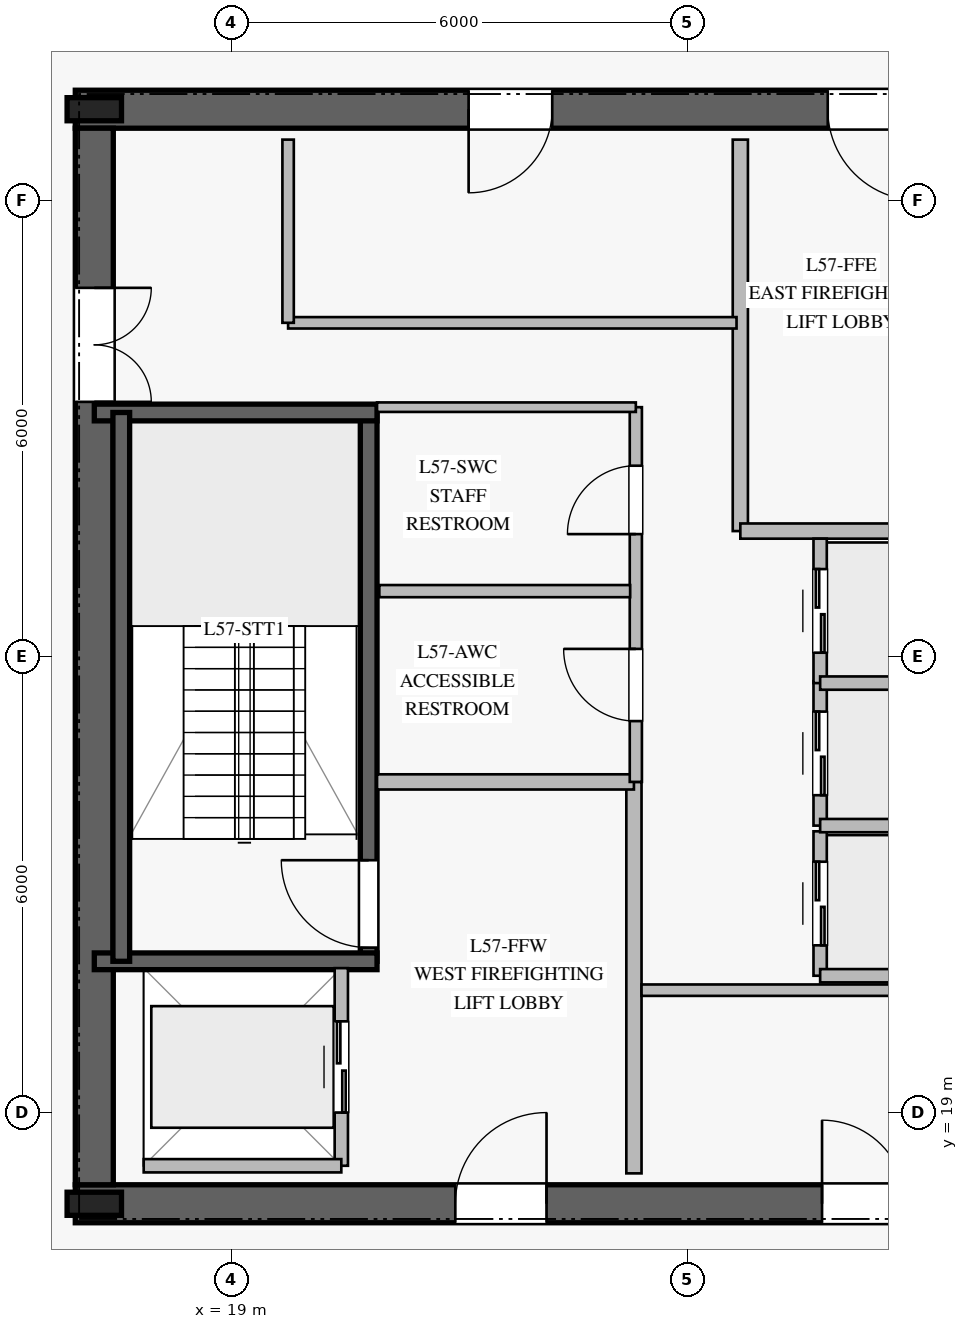
"""IFC4 building model, lengths in metres.
Left out: names, types, materials, properties, quantities, classifications, styles, units other than length and angle.
Written with IfcOpenShell. Run it as: python <this file> out.ifc"""

import sys

from ifc_helpers import new_model, si_unit, direction, frame, frame_2d, origin, origin_2d, place, context, subcontext, project, spatial, rectangle, i_section, extrude, element, fill, save


model = new_model("IFC4")
c1 = context("Model", 3, precision=1e-05, world=origin(), true_north=direction((0.0, 1.0)))
c2 = subcontext(c1, "Body", "Model", "MODEL_VIEW")
j1 = project(units=[si_unit("LENGTHUNIT", "METRE"), si_unit("PLANEANGLEUNIT", "RADIAN")], contexts=[c1])
p1 = place(None, origin())
s1 = spatial("IfcSite", under=j1, at=p1, CompositionType="ELEMENT")
p2 = place(p1, origin())
s2 = spatial("IfcBuilding", under=s1, at=p2, CompositionType="ELEMENT")
p3 = place(p2, frame((0.0, 0.0, 236.8)))
s3 = spatial("IfcBuildingStorey", under=s2, at=p3, CompositionType="ELEMENT", Elevation=236.8)
p4 = place(p3, frame((16.95, 17.8, 0.0), z_axis=(0.0, 0.0, 1.0), x_axis=(1.0, 0.0, 0.0)))
e1 = element("IfcWall", 1, at=p4, inside=s3, PredefinedType="SHEAR", context=c2, shape_type="SweptSolid", body=[
    extrude(rectangle(XDim=16.1, YDim=0.5, at=frame_2d((8.05, 0.0))), origin(), (0.0, 0.0, 1.0), 3.78),
])
p5 = place(p4, frame((5.0, 0.0, 0.0)))
e2 = element("IfcOpeningElement", 2, at=p5, cuts=e1, PredefinedType="OPENING", context=c2, shape_type="SweptSolid", body=[
    extrude(rectangle(XDim=1.2, YDim=2.25, at=frame_2d((0.6, 1.125))), frame((0.0, 0.26, 0.0), z_axis=(0.0, -1.0, 0.0), x_axis=(1.0, 0.0, 0.0)), (0.0, 0.0, 1.0), 0.52),
])
p6 = place(p4, frame((13.95, 0.0, 0.0)))
e3 = element("IfcOpeningElement", 3, at=p6, cuts=e1, PredefinedType="OPENING", context=c2, shape_type="SweptSolid", body=[
    extrude(rectangle(XDim=0.9, YDim=2.1, at=frame_2d((0.45, 1.05))), frame((0.0, 0.26, 0.0), z_axis=(0.0, -1.0, 0.0), x_axis=(1.0, 0.0, 0.0)), (0.0, 0.0, 1.0), 0.52),
])
p7 = place(p4, frame((9.825, 0.0, 0.0)))
e4 = element("IfcOpeningElement", 4, at=p7, cuts=e1, PredefinedType="OPENING", context=c2, shape_type="SweptSolid", body=[
    extrude(rectangle(XDim=1.1, YDim=2.2, at=frame_2d((0.55, 1.1))), frame((0.0, 0.26, 0.0), z_axis=(0.0, -1.0, 0.0), x_axis=(1.0, 0.0, 0.0)), (0.0, 0.0, 1.0), 0.52),
])
p8 = place(p3, frame((33.05, 32.2, 0.0), z_axis=(0.0, 0.0, 1.0), x_axis=(-1.0, 0.0, 0.0)))
e5 = element("IfcWall", 5, at=p8, inside=s3, PredefinedType="SHEAR", context=c2, shape_type="SweptSolid", body=[
    extrude(rectangle(XDim=16.1, YDim=0.5, at=frame_2d((8.05, 0.0))), origin(), (0.0, 0.0, 1.0), 3.78),
])
p9 = place(p8, frame((5.0, 0.0, 0.0)))
e6 = element("IfcOpeningElement", 6, at=p9, cuts=e5, PredefinedType="OPENING", context=c2, shape_type="SweptSolid", body=[
    extrude(rectangle(XDim=1.2, YDim=2.25, at=frame_2d((0.6, 1.125))), frame((0.0, 0.26, 0.0), z_axis=(0.0, -1.0, 0.0), x_axis=(1.0, 0.0, 0.0)), (0.0, 0.0, 1.0), 0.52),
])
p10 = place(p8, frame((9.825, 0.0, 0.0)))
e7 = element("IfcOpeningElement", 7, at=p10, cuts=e5, PredefinedType="OPENING", context=c2, shape_type="SweptSolid", body=[
    extrude(rectangle(XDim=1.1, YDim=2.2, at=frame_2d((0.55, 1.1))), frame((0.0, 0.26, 0.0), z_axis=(0.0, -1.0, 0.0), x_axis=(1.0, 0.0, 0.0)), (0.0, 0.0, 1.0), 0.52),
])
p11 = place(p3, frame((17.2, 31.95, 0.0), z_axis=(0.0, 0.0, 1.0), x_axis=(0.0, -1.0, 0.0)))
e8 = element("IfcWall", 8, at=p11, inside=s3, PredefinedType="SHEAR", context=c2, shape_type="SweptSolid", body=[
    extrude(rectangle(XDim=13.9, YDim=0.5, at=frame_2d((6.95, 0.0))), origin(), (0.0, 0.0, 1.0), 3.78),
])
p12 = place(p11, frame((2.1, 0.0, 0.0)))
e9 = element("IfcOpeningElement", 9, at=p12, cuts=e8, PredefinedType="OPENING", context=c2, shape_type="SweptSolid", body=[
    extrude(rectangle(XDim=1.5, YDim=2.2, at=frame_2d((0.75, 1.1))), frame((0.0, 0.26, 0.0), z_axis=(0.0, -1.0, 0.0), x_axis=(1.0, 0.0, 0.0)), (0.0, 0.0, 1.0), 0.52),
])
for number, where, z_axis, x_axis in (
    (10, (17.2, 17.8, 0.0), (0.0, 0.0, 1.0), (1.0, 0.0, 0.0)),
    (11, (17.2, 32.2, 0.0), (0.0, 0.0, 1.0), (1.0, 0.0, 0.0)),
):
    element("IfcColumn", number, at=place(p3, frame(where, z_axis=z_axis, x_axis=x_axis)), inside=s3, PredefinedType="COLUMN", context=c2, shape_type="SweptSolid", body=[
        extrude(i_section(OverallWidth=0.304, OverallDepth=0.716, WebThickness=0.021, FlangeThickness=0.04, at=origin_2d()), origin(), (0.0, 0.0, 1.0), 4.0),
    ])
p13 = place(p3, frame((20.81, 20.99, 0.0), z_axis=(0.0, 0.0, 1.0), x_axis=(0.0, 1.0, 0.0)))
e12 = element("IfcWall", 12, at=p13, inside=s3, PredefinedType="SOLIDWALL", context=c2, shape_type="SweptSolid", body=[
    extrude(rectangle(XDim=7.22, YDim=0.22, at=frame_2d((3.61, 0.0))), origin(), (0.0, 0.0, 1.0), 3.78),
])
p14 = place(p13, frame((0.18, 0.0, 0.0)))
e13 = element("IfcOpeningElement", 13, at=p14, cuts=e12, PredefinedType="OPENING", context=c2, shape_type="SweptSolid", body=[
    extrude(rectangle(XDim=1.15, YDim=2.2, at=frame_2d((0.575, 1.1))), frame((0.0, 0.12, 0.0), z_axis=(0.0, -1.0, 0.0), x_axis=(1.0, 0.0, 0.0)), (0.0, 0.0, 1.0), 0.24),
])
for number, where, z_axis, x_axis in (
    (14, (17.2, 20.99, 0.0), (0.0, 0.0, 1.0), (1.0, 0.0, 0.0)),
    (15, (17.2, 28.21, 0.0), (0.0, 0.0, 1.0), (1.0, 0.0, 0.0)),
):
    element("IfcWall", number, at=place(p3, frame(where, z_axis=z_axis, x_axis=x_axis)), inside=s3, PredefinedType="SOLIDWALL", context=c2, shape_type="SweptSolid", body=[
        extrude(rectangle(XDim=3.72, YDim=0.22, at=frame_2d((1.86, 0.0))), origin(), (0.0, 0.0, 1.0), 3.78),
    ])
p15 = place(p3, frame((17.555, 28.21, 0.0), z_axis=(0.0, 0.0, 1.0), x_axis=(0.0, -1.0, 0.0)))
e16 = element("IfcWall", 16, at=p15, inside=s3, PredefinedType="SOLIDWALL", context=c2, shape_type="SweptSolid", body=[
    extrude(rectangle(XDim=7.22, YDim=0.22, at=frame_2d((3.61, 0.0))), origin(), (0.0, 0.0, 1.0), 3.78),
])
p16 = place(p3, frame((24.3, 18.2, 0.0), z_axis=(0.0, 0.0, 1.0), x_axis=(0.0, 1.0, 0.0)))
e17 = element("IfcWall", 17, at=p16, inside=s3, PredefinedType="PARTITIONING", context=c2, shape_type="SweptSolid", body=[
    extrude(rectangle(XDim=5.15, YDim=0.2, at=frame_2d((2.575, 0.0))), origin(), (0.0, 0.0, 1.0), 3.78),
])
p17 = place(p3, frame((20.92, 23.35, 0.0), z_axis=(0.0, 0.0, 1.0), x_axis=(1.0, 0.0, 0.0)))
e18 = element("IfcWall", 18, at=p17, inside=s3, PredefinedType="PARTITIONING", context=c2, shape_type="SweptSolid", body=[
    extrude(rectangle(XDim=3.38, YDim=0.2, at=frame_2d((1.69, 0.0))), origin(), (0.0, 0.0, 1.0), 3.78),
])
p18 = place(p3, frame((25.7, 26.65, 0.0), z_axis=(0.0, 0.0, 1.0), x_axis=(0.0, 1.0, 0.0)))
e19 = element("IfcWall", 19, at=p18, inside=s3, PredefinedType="PARTITIONING", context=c2, shape_type="SweptSolid", body=[
    extrude(rectangle(XDim=5.15, YDim=0.2, at=frame_2d((2.575, 0.0))), origin(), (0.0, 0.0, 1.0), 3.78),
])
p19 = place(p3, frame((25.7, 26.65, 0.0), z_axis=(0.0, 0.0, 1.0), x_axis=(1.0, 0.0, 0.0)))
e20 = element("IfcWall", 20, at=p19, inside=s3, PredefinedType="PARTITIONING", context=c2, shape_type="SweptSolid", body=[
    extrude(rectangle(XDim=3.38, YDim=0.2, at=frame_2d((1.69, 0.0))), origin(), (0.0, 0.0, 1.0), 3.78),
])
p20 = place(p3, frame((24.325, 23.35, 0.0), z_axis=(0.0, 0.0, 1.0), x_axis=(0.0, 1.0, 0.0)))
e21 = element("IfcWall", 21, at=p20, inside=s3, PredefinedType="PLUMBINGWALL", context=c2, shape_type="SweptSolid", body=[
    extrude(rectangle(XDim=4.93, YDim=0.16, at=frame_2d((2.465, 0.0))), origin(), (0.0, 0.0, 1.0), 3.78),
])
p21 = place(p20, frame((0.8, 0.0, 0.0)))
e22 = element("IfcOpeningElement", 22, at=p21, cuts=e21, PredefinedType="OPENING", context=c2, shape_type="SweptSolid", body=[
    extrude(rectangle(XDim=0.95, YDim=2.1, at=frame_2d((0.475, 1.05))), frame((0.0, 0.09, 0.0), z_axis=(0.0, -1.0, 0.0), x_axis=(1.0, 0.0, 0.0)), (0.0, 0.0, 1.0), 0.18),
])
p22 = place(p20, frame((3.26, 0.0, 0.0)))
e23 = element("IfcOpeningElement", 23, at=p22, cuts=e21, PredefinedType="OPENING", context=c2, shape_type="SweptSolid", body=[
    extrude(rectangle(XDim=0.9, YDim=2.1, at=frame_2d((0.45, 1.05))), frame((0.0, 0.09, 0.0), z_axis=(0.0, -1.0, 0.0), x_axis=(1.0, 0.0, 0.0)), (0.0, 0.0, 1.0), 0.18),
])
p23 = place(p3, frame((20.92, 28.28, 0.0), z_axis=(0.0, 0.0, 1.0), x_axis=(1.0, 0.0, 0.0)))
e24 = element("IfcWall", 24, at=p23, inside=s3, PredefinedType="PARTITIONING", context=c2, shape_type="SweptSolid", body=[
    extrude(rectangle(XDim=3.405, YDim=0.125, at=frame_2d((1.703, 0.0))), origin(), (0.0, 0.0, 1.0), 3.78),
])
p24 = place(p3, frame((20.95, 25.86, 0.0), z_axis=(0.0, 0.0, 1.0), x_axis=(1.0, 0.0, 0.0)))
e25 = element("IfcWall", 25, at=p24, inside=s3, PredefinedType="PLUMBINGWALL", context=c2, shape_type="SweptSolid", body=[
    extrude(rectangle(XDim=3.3, YDim=0.16, at=frame_2d((1.65, 0.0))), origin(), (0.0, 0.0, 1.0), 3.78),
])
p25 = place(p3, frame((24.4, 20.61, 0.0), z_axis=(0.0, 0.0, 1.0), x_axis=(1.0, 0.0, 0.0)))
e26 = element("IfcWall", 26, at=p25, inside=s3, PredefinedType="PARTITIONING", context=c2, shape_type="SweptSolid", body=[
    extrude(rectangle(XDim=5.9, YDim=0.15, at=frame_2d((2.95, 0.0))), origin(), (0.0, 0.0, 1.0), 3.78),
])
p26 = place(p3, frame((19.75, 29.39, 0.0), z_axis=(0.0, 0.0, 1.0), x_axis=(1.0, 0.0, 0.0)))
e27 = element("IfcWall", 27, at=p26, inside=s3, PredefinedType="PARTITIONING", context=c2, shape_type="SweptSolid", body=[
    extrude(rectangle(XDim=5.9, YDim=0.15, at=frame_2d((2.95, 0.0))), origin(), (0.0, 0.0, 1.0), 3.78),
])
p27 = place(p3, frame((19.75, 29.39, 0.0), z_axis=(0.0, 0.0, 1.0), x_axis=(0.0, 1.0, 0.0)))
e28 = element("IfcWall", 28, at=p27, inside=s3, PredefinedType="PARTITIONING", context=c2, shape_type="SweptSolid", body=[
    extrude(rectangle(XDim=2.41, YDim=0.15, at=frame_2d((1.205, 0.0))), origin(), (0.0, 0.0, 1.0), 3.78),
])
p28 = place(p3, frame((26.75, 20.8, 0.0), z_axis=(0.0, 0.0, 1.0), x_axis=(0.0, 1.0, 0.0)))
e29 = element("IfcWall", 29, at=p28, inside=s3, PredefinedType="PARTITIONING", context=c2, shape_type="SweptSolid", body=[
    extrude(rectangle(XDim=1.9, YDim=0.175, at=frame_2d((0.95, 0.0))), origin(), (0.0, 0.0, 1.0), 3.78),
])
p29 = place(p28, frame((0.4, 0.0, 0.0)))
e30 = element("IfcOpeningElement", 30, at=p29, cuts=e29, PredefinedType="OPENING", context=c2, shape_type="SweptSolid", body=[
    extrude(rectangle(XDim=1.1, YDim=2.2, at=frame_2d((0.55, 1.1))), frame((0.0, 0.098, 0.0), z_axis=(0.0, -1.0, 0.0), x_axis=(1.0, 0.0, 0.0)), (0.0, 0.0, 1.0), 0.195),
])
p30 = place(p3, frame((26.75, 20.8, 0.0), z_axis=(0.0, 0.0, 1.0), x_axis=(1.0, 0.0, 0.0)))
e31 = element("IfcWall", 31, at=p30, inside=s3, PredefinedType="PARTITIONING", context=c2, shape_type="SweptSolid", body=[
    extrude(rectangle(XDim=2.35, YDim=0.175, at=frame_2d((1.175, 0.0))), origin(), (0.0, 0.0, 1.0), 3.78),
])
p31 = place(p3, frame((26.75, 22.775, 0.0), z_axis=(0.0, 0.0, 1.0), x_axis=(0.0, 1.0, 0.0)))
e32 = element("IfcWall", 32, at=p31, inside=s3, PredefinedType="PARTITIONING", context=c2, shape_type="SweptSolid", body=[
    extrude(rectangle(XDim=1.9, YDim=0.175, at=frame_2d((0.95, 0.0))), origin(), (0.0, 0.0, 1.0), 3.78),
])
p32 = place(p31, frame((0.4, 0.0, 0.0)))
e33 = element("IfcOpeningElement", 33, at=p32, cuts=e32, PredefinedType="OPENING", context=c2, shape_type="SweptSolid", body=[
    extrude(rectangle(XDim=1.1, YDim=2.2, at=frame_2d((0.55, 1.1))), frame((0.0, 0.098, 0.0), z_axis=(0.0, -1.0, 0.0), x_axis=(1.0, 0.0, 0.0)), (0.0, 0.0, 1.0), 0.195),
])
p33 = place(p3, frame((26.75, 22.775, 0.0), z_axis=(0.0, 0.0, 1.0), x_axis=(1.0, 0.0, 0.0)))
e34 = element("IfcWall", 34, at=p33, inside=s3, PredefinedType="PARTITIONING", context=c2, shape_type="SweptSolid", body=[
    extrude(rectangle(XDim=2.35, YDim=0.175, at=frame_2d((1.175, 0.0))), origin(), (0.0, 0.0, 1.0), 3.78),
])
p34 = place(p3, frame((26.75, 24.65, 0.0), z_axis=(0.0, 0.0, 1.0), x_axis=(0.0, 1.0, 0.0)))
e35 = element("IfcWall", 35, at=p34, inside=s3, PredefinedType="PARTITIONING", context=c2, shape_type="SweptSolid", body=[
    extrude(rectangle(XDim=1.9, YDim=0.175, at=frame_2d((0.95, 0.0))), origin(), (0.0, 0.0, 1.0), 3.78),
])
p35 = place(p34, frame((0.4, 0.0, 0.0)))
e36 = element("IfcOpeningElement", 36, at=p35, cuts=e35, PredefinedType="OPENING", context=c2, shape_type="SweptSolid", body=[
    extrude(rectangle(XDim=1.1, YDim=2.2, at=frame_2d((0.55, 1.1))), frame((0.0, 0.098, 0.0), z_axis=(0.0, -1.0, 0.0), x_axis=(1.0, 0.0, 0.0)), (0.0, 0.0, 1.0), 0.195),
])
p36 = place(p3, frame((26.75, 24.65, 0.0), z_axis=(0.0, 0.0, 1.0), x_axis=(1.0, 0.0, 0.0)))
e37 = element("IfcWall", 37, at=p36, inside=s3, PredefinedType="PARTITIONING", context=c2, shape_type="SweptSolid", body=[
    extrude(rectangle(XDim=2.35, YDim=0.175, at=frame_2d((1.175, 0.0))), origin(), (0.0, 0.0, 1.0), 3.78),
])
p37 = place(p3, frame((20.45, 18.3, 0.0), z_axis=(0.0, 0.0, 1.0), x_axis=(0.0, 1.0, 0.0)))
e38 = element("IfcWall", 38, at=p37, inside=s3, PredefinedType="PARTITIONING", context=c2, shape_type="SweptSolid", body=[
    extrude(rectangle(XDim=2.6, YDim=0.175, at=frame_2d((1.3, 0.0))), origin(), (0.0, 0.0, 1.0), 3.78),
])
p38 = place(p37, frame((0.7, 0.0, 0.0)))
e39 = element("IfcOpeningElement", 39, at=p38, cuts=e38, PredefinedType="OPENING", context=c2, shape_type="SweptSolid", body=[
    extrude(rectangle(XDim=1.2, YDim=2.2, at=frame_2d((0.6, 1.1))), frame((0.0, 0.098, 0.0), z_axis=(0.0, -1.0, 0.0), x_axis=(1.0, 0.0, 0.0)), (0.0, 0.0, 1.0), 0.195),
])
p39 = place(p3, frame((17.85, 18.3, 0.0), z_axis=(0.0, 0.0, 1.0), x_axis=(1.0, 0.0, 0.0)))
e40 = element("IfcWall", 40, at=p39, inside=s3, PredefinedType="PARTITIONING", context=c2, shape_type="SweptSolid", body=[
    extrude(rectangle(XDim=2.6, YDim=0.175, at=frame_2d((1.3, 0.0))), origin(), (0.0, 0.0, 1.0), 3.78),
])
p40 = place(p14, origin())
e41 = element("IfcDoor", 41, at=p40, inside=s3, OperationType="SINGLE_SWING_RIGHT", PredefinedType="DOOR", context=c2, shape_type="SweptSolid", body=[
    extrude(rectangle(XDim=1.15, YDim=2.2, at=frame_2d((0.575, 1.1))), frame((0.0, 0.025, 0.0), z_axis=(0.0, -1.0, 0.0), x_axis=(1.0, 0.0, 0.0)), (0.0, 0.0, 1.0), 0.05),
])
fill(e13, e41)
p41 = place(p5, origin())
e42 = element("IfcDoor", 42, at=p41, inside=s3, OperationType="SINGLE_SWING_RIGHT", PredefinedType="DOOR", context=c2, shape_type="SweptSolid", body=[
    extrude(rectangle(XDim=1.2, YDim=2.25, at=frame_2d((0.6, 1.125))), frame((0.0, 0.025, 0.0), z_axis=(0.0, -1.0, 0.0), x_axis=(1.0, 0.0, 0.0)), (0.0, 0.0, 1.0), 0.05),
])
fill(e2, e42)
p42 = place(p9, origin())
e43 = element("IfcDoor", 43, at=p42, inside=s3, OperationType="SINGLE_SWING_LEFT", PredefinedType="DOOR", context=c2, shape_type="SweptSolid", body=[
    extrude(rectangle(XDim=1.2, YDim=2.25, at=frame_2d((0.6, 1.125))), frame((0.0, 0.025, 0.0), z_axis=(0.0, -1.0, 0.0), x_axis=(1.0, 0.0, 0.0)), (0.0, 0.0, 1.0), 0.05),
])
fill(e6, e43)
p43 = place(p12, origin())
e44 = element("IfcDoor", 44, at=p43, inside=s3, OperationType="DOUBLE_DOOR_SINGLE_SWING", PredefinedType="DOOR", context=c2, shape_type="SweptSolid", body=[
    extrude(rectangle(XDim=1.5, YDim=2.2, at=frame_2d((0.75, 1.1))), frame((0.0, 0.025, 0.0), z_axis=(0.0, -1.0, 0.0), x_axis=(1.0, 0.0, 0.0)), (0.0, 0.0, 1.0), 0.05),
])
fill(e9, e44)
p44 = place(p21, origin())
e45 = element("IfcDoor", 45, at=p44, inside=s3, OperationType="SINGLE_SWING_RIGHT", PredefinedType="DOOR", context=c2, shape_type="SweptSolid", body=[
    extrude(rectangle(XDim=0.95, YDim=2.1, at=frame_2d((0.475, 1.05))), frame((0.0, 0.025, 0.0), z_axis=(0.0, -1.0, 0.0), x_axis=(1.0, 0.0, 0.0)), (0.0, 0.0, 1.0), 0.05),
])
fill(e22, e45)
p45 = place(p22, origin())
e46 = element("IfcDoor", 46, at=p45, inside=s3, OperationType="SINGLE_SWING_LEFT", PredefinedType="DOOR", context=c2, shape_type="SweptSolid", body=[
    extrude(rectangle(XDim=0.9, YDim=2.1, at=frame_2d((0.45, 1.05))), frame((0.0, 0.025, 0.0), z_axis=(0.0, -1.0, 0.0), x_axis=(1.0, 0.0, 0.0)), (0.0, 0.0, 1.0), 0.05),
])
fill(e23, e46)
p46 = place(p7, origin())
e47 = element("IfcDoor", 47, at=p46, inside=s3, OperationType="SINGLE_SWING_LEFT", PredefinedType="DOOR", context=c2, shape_type="SweptSolid", body=[
    extrude(rectangle(XDim=1.1, YDim=2.2, at=frame_2d((0.55, 1.1))), frame((0.0, 0.025, 0.0), z_axis=(0.0, -1.0, 0.0), x_axis=(1.0, 0.0, 0.0)), (0.0, 0.0, 1.0), 0.05),
])
fill(e4, e47)
p47 = place(p10, origin())
e48 = element("IfcDoor", 48, at=p47, inside=s3, OperationType="SINGLE_SWING_RIGHT", PredefinedType="DOOR", context=c2, shape_type="SweptSolid", body=[
    extrude(rectangle(XDim=1.1, YDim=2.2, at=frame_2d((0.55, 1.1))), frame((0.0, 0.025, 0.0), z_axis=(0.0, -1.0, 0.0), x_axis=(1.0, 0.0, 0.0)), (0.0, 0.0, 1.0), 0.05),
])
fill(e7, e48)
p48 = place(p29, origin())
e49 = element("IfcDoor", 49, at=p48, inside=s3, OperationType="DOUBLE_DOOR_SLIDING", PredefinedType="DOOR", context=c2, shape_type="SweptSolid", body=[
    extrude(rectangle(XDim=1.1, YDim=2.2, at=frame_2d((0.55, 1.1))), frame((0.0, 0.025, 0.0), z_axis=(0.0, -1.0, 0.0), x_axis=(1.0, 0.0, 0.0)), (0.0, 0.0, 1.0), 0.05),
])
fill(e30, e49)
p49 = place(p32, origin())
e50 = element("IfcDoor", 50, at=p49, inside=s3, OperationType="DOUBLE_DOOR_SLIDING", PredefinedType="DOOR", context=c2, shape_type="SweptSolid", body=[
    extrude(rectangle(XDim=1.1, YDim=2.2, at=frame_2d((0.55, 1.1))), frame((0.0, 0.025, 0.0), z_axis=(0.0, -1.0, 0.0), x_axis=(1.0, 0.0, 0.0)), (0.0, 0.0, 1.0), 0.05),
])
fill(e33, e50)
p50 = place(p35, origin())
e51 = element("IfcDoor", 51, at=p50, inside=s3, OperationType="DOUBLE_DOOR_SLIDING", PredefinedType="DOOR", context=c2, shape_type="SweptSolid", body=[
    extrude(rectangle(XDim=1.1, YDim=2.2, at=frame_2d((0.55, 1.1))), frame((0.0, 0.025, 0.0), z_axis=(0.0, -1.0, 0.0), x_axis=(1.0, 0.0, 0.0)), (0.0, 0.0, 1.0), 0.05),
])
fill(e36, e51)
p51 = place(p38, origin())
e52 = element("IfcDoor", 52, at=p51, inside=s3, OperationType="DOUBLE_DOOR_SLIDING", PredefinedType="DOOR", context=c2, shape_type="SweptSolid", body=[
    extrude(rectangle(XDim=1.2, YDim=2.2, at=frame_2d((0.6, 1.1))), frame((0.0, 0.025, 0.0), z_axis=(0.0, -1.0, 0.0), x_axis=(1.0, 0.0, 0.0)), (0.0, 0.0, 1.0), 0.05),
])
fill(e39, e52)
save(model, sys.argv[1])
